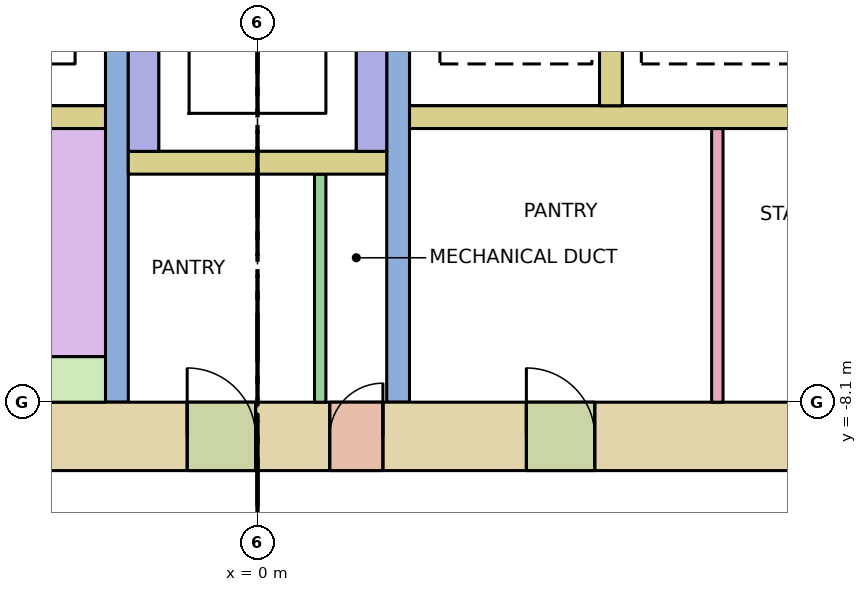
"""IFC4 building model, lengths in metres.
Left out: names, types, materials, properties, quantities, classifications, styles, units other than length and angle.
Written with IfcOpenShell. Run it as: python <this file> out.ifc"""

import sys

from ifc_helpers import new_model, si_unit, direction, frame, frame_2d, origin, place, context, subcontext, project, spatial, rectangle, extrude, element, fill, save


model = new_model("IFC4")
c1 = context("Model", 3, precision=1e-05, world=origin(), true_north=direction((0.0, 1.0)))
c2 = subcontext(c1, "Body", "Model", "MODEL_VIEW")
j1 = project(units=[si_unit("LENGTHUNIT", "METRE"), si_unit("PLANEANGLEUNIT", "RADIAN")], contexts=[c1])
p1 = place(None, origin())
s1 = spatial("IfcSite", under=j1, at=p1, CompositionType="ELEMENT")
p2 = place(p1, origin())
s2 = spatial("IfcBuilding", under=s1, at=p2, CompositionType="ELEMENT")
p3 = place(p2, frame((0.0, 0.0, 27.0)))
s3 = spatial("IfcBuildingStorey", under=s2, at=p3, CompositionType="ELEMENT", Elevation=27.0)
p4 = place(p3, frame((-7.13, -8.55, -0.28), z_axis=(0.0, 0.0, 1.0), x_axis=(1.0, 0.0, 0.0)))
e1 = element("IfcWall", 1, at=p4, inside=s3, PredefinedType="SHEAR", context=c2, shape_type="SweptSolid", body=[
    extrude(rectangle(XDim=14.26, YDim=0.9, at=frame_2d((7.13, 0.0))), origin(), (0.0, 0.0, 1.0), 4.0),
])
p5 = place(p4, frame((8.08, 0.0, 0.28)))
e2 = element("IfcOpeningElement", 2, at=p5, cuts=e1, PredefinedType="OPENING", context=c2, shape_type="SweptSolid", body=[
    extrude(rectangle(XDim=0.7, YDim=2.1, at=frame_2d((0.35, 1.05))), frame((0.0, 0.46, 0.0), z_axis=(0.0, -1.0, 0.0), x_axis=(1.0, 0.0, 0.0)), (0.0, 0.0, 1.0), 0.92),
])
p6 = place(p4, frame((6.205, 0.0, 0.28)))
e3 = element("IfcOpeningElement", 3, at=p6, cuts=e1, PredefinedType="OPENING", context=c2, shape_type="SweptSolid", body=[
    extrude(rectangle(XDim=0.9, YDim=2.1, at=frame_2d((0.45, 1.05))), frame((0.0, 0.46, 0.0), z_axis=(0.0, -1.0, 0.0), x_axis=(1.0, 0.0, 0.0)), (0.0, 0.0, 1.0), 0.92),
])
p7 = place(p4, frame((10.667, 0.0, 0.28)))
e4 = element("IfcOpeningElement", 4, at=p7, cuts=e1, PredefinedType="OPENING", context=c2, shape_type="SweptSolid", body=[
    extrude(rectangle(XDim=0.9, YDim=2.1, at=frame_2d((0.45, 1.05))), frame((0.0, 0.46, 0.0), z_axis=(0.0, -1.0, 0.0), x_axis=(1.0, 0.0, 0.0)), (0.0, 0.0, 1.0), 0.92),
])
for number, where, z_axis, x_axis in (
    (5, (-10.1, -4.35, 0.0), (0.0, 0.0, 1.0), (1.0, 0.0, 0.0)),
    (6, (2.0, -4.35, 0.0), (0.0, 0.0, 1.0), (1.0, 0.0, 0.0)),
):
    element("IfcWall", number, at=place(p3, frame(where, z_axis=z_axis, x_axis=x_axis)), inside=s3, PredefinedType="SOLIDWALL", context=c2, shape_type="SweptSolid", body=[
        extrude(rectangle(XDim=8.1, YDim=0.3, at=frame_2d((4.05, 0.0))), origin(), (0.0, 0.0, 1.0), 3.72),
    ])
p8 = place(p3, frame((4.65, -4.2, 0.0), z_axis=(0.0, 0.0, 1.0), x_axis=(0.0, 1.0, 0.0)))
e7 = element("IfcWall", 7, at=p8, inside=s3, PredefinedType="SOLIDWALL", context=c2, shape_type="SweptSolid", body=[
    extrude(rectangle(XDim=2.4, YDim=0.3, at=frame_2d((1.2, 0.0))), origin(), (0.0, 0.0, 1.0), 3.72),
])
for number, where, z_axis, x_axis in (
    (8, (-1.85, -8.1, 0.0), (0.0, 0.0, 1.0), (0.0, 1.0, 0.0)),
    (9, (1.85, -8.1, 0.0), (0.0, 0.0, 1.0), (0.0, 1.0, 0.0)),
):
    element("IfcWall", number, at=place(p3, frame(where, z_axis=z_axis, x_axis=x_axis)), inside=s3, PredefinedType="SHEAR", context=c2, shape_type="SweptSolid", body=[
        extrude(rectangle(XDim=6.6, YDim=0.3, at=frame_2d((3.3, 0.0))), origin(), (0.0, 0.0, 1.0), 3.72),
    ])
for number, where, z_axis, x_axis in (
    (10, (-1.5, -4.8, 0.0), (0.0, 0.0, 1.0), (0.0, 1.0, 0.0)),
    (11, (1.5, -4.8, 0.0), (0.0, 0.0, 1.0), (0.0, 1.0, 0.0)),
):
    element("IfcWall", number, at=place(p3, frame(where, z_axis=z_axis, x_axis=x_axis)), inside=s3, PredefinedType="SOLIDWALL", context=c2, shape_type="SweptSolid", body=[
        extrude(rectangle(XDim=3.0, YDim=0.4, at=frame_2d((1.5, 0.0))), origin(), (0.0, 0.0, 1.0), 3.72),
    ])
p9 = place(p3, frame((-1.7, -4.95, 0.0), z_axis=(0.0, 0.0, 1.0), x_axis=(1.0, 0.0, 0.0)))
e12 = element("IfcWall", 12, at=p9, inside=s3, PredefinedType="SOLIDWALL", context=c2, shape_type="SweptSolid", body=[
    extrude(rectangle(XDim=3.4, YDim=0.3, at=frame_2d((1.7, 0.0))), origin(), (0.0, 0.0, 1.0), 3.72),
])
p10 = place(p3, frame((-7.37, -7.8, 0.0), z_axis=(0.0, 0.0, 1.0), x_axis=(1.0, 0.0, 0.0)))
e13 = element("IfcWall", 13, at=p10, inside=s3, PredefinedType="SHEAR", context=c2, shape_type="SweptSolid", body=[
    extrude(rectangle(XDim=5.37, YDim=0.6, at=frame_2d((2.685, 0.0))), origin(), (0.0, 0.0, 1.0), 3.72),
])
p11 = place(p3, frame((0.825, -8.1, 0.0), z_axis=(0.0, 0.0, 1.0), x_axis=(0.0, 1.0, 0.0)))
e14 = element("IfcWall", 14, at=p11, inside=s3, PredefinedType="PARTITIONING", context=c2, shape_type="SweptSolid", body=[
    extrude(rectangle(XDim=3.0, YDim=0.15, at=frame_2d((1.5, 0.0))), origin(), (0.0, 0.0, 1.0), 3.72),
])
p12 = place(p3, frame((6.05, -8.1, 0.0), z_axis=(0.0, 0.0, 1.0), x_axis=(0.0, 1.0, 0.0)))
e15 = element("IfcWall", 15, at=p12, inside=s3, PredefinedType="PARTITIONING", context=c2, shape_type="SweptSolid", body=[
    extrude(rectangle(XDim=3.6, YDim=0.15, at=frame_2d((1.8, 0.0))), origin(), (0.0, 0.0, 1.0), 3.72),
])
p13 = place(p5, origin())
e16 = element("IfcDoor", 16, at=p13, inside=s3, OperationType="SINGLE_SWING_RIGHT", PredefinedType="DOOR", context=c2, shape_type="SweptSolid", body=[
    extrude(rectangle(XDim=0.7, YDim=2.1, at=frame_2d((0.35, 1.05))), frame((0.0, 0.025, 0.0), z_axis=(0.0, -1.0, 0.0), x_axis=(1.0, 0.0, 0.0)), (0.0, 0.0, 1.0), 0.05),
])
fill(e2, e16)
p14 = place(p6, origin())
e17 = element("IfcDoor", 17, at=p14, inside=s3, OperationType="SINGLE_SWING_LEFT", PredefinedType="DOOR", context=c2, shape_type="SweptSolid", body=[
    extrude(rectangle(XDim=0.9, YDim=2.1, at=frame_2d((0.45, 1.05))), frame((0.0, 0.025, 0.0), z_axis=(0.0, -1.0, 0.0), x_axis=(1.0, 0.0, 0.0)), (0.0, 0.0, 1.0), 0.05),
])
fill(e3, e17)
p15 = place(p7, origin())
e18 = element("IfcDoor", 18, at=p15, inside=s3, OperationType="SINGLE_SWING_LEFT", PredefinedType="DOOR", context=c2, shape_type="SweptSolid", body=[
    extrude(rectangle(XDim=0.9, YDim=2.1, at=frame_2d((0.45, 1.05))), frame((0.0, 0.025, 0.0), z_axis=(0.0, -1.0, 0.0), x_axis=(1.0, 0.0, 0.0)), (0.0, 0.0, 1.0), 0.05),
])
fill(e4, e18)
save(model, sys.argv[1])
